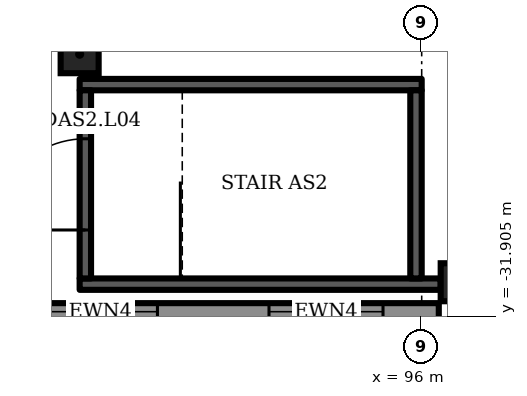
"""IFC4 building model, lengths in metres.
Left out: names, types, materials, properties, quantities, classifications, styles, units other than length and angle.
Written with IfcOpenShell. Run it as: python <this file> out.ifc"""

import sys

from ifc_helpers import new_model, si_unit, direction, frame, frame_2d, origin, origin_2d, place, context, subcontext, project, spatial, rectangle, extrude, element, fill, save


model = new_model("IFC4")
c1 = context("Model", 3, precision=1e-05, world=origin(), true_north=direction((0.0, 1.0)))
c2 = subcontext(c1, "Body", "Model", "MODEL_VIEW")
j1 = project(units=[si_unit("LENGTHUNIT", "METRE"), si_unit("PLANEANGLEUNIT", "RADIAN")], contexts=[c1])
p1 = place(None, origin())
s1 = spatial("IfcSite", under=j1, at=p1, CompositionType="ELEMENT")
p2 = place(p1, origin())
s2 = spatial("IfcBuilding", under=s1, at=p2, CompositionType="ELEMENT")
p3 = place(p2, frame((0.0, 0.0, 27.5)))
s3 = spatial("IfcBuildingStorey", under=s2, at=p3, CompositionType="ELEMENT", Elevation=27.5)
for number, where, z_axis, x_axis in (
    (1, (97.0, -31.0, 0.0), (0.0, 0.0, 1.0), (1.0, 0.0, 0.0)),
    (2, (87.0, -25.0, 0.0), (0.0, 0.0, 1.0), (1.0, 0.0, 0.0)),
):
    element("IfcColumn", number, at=place(p3, frame(where, z_axis=z_axis, x_axis=x_axis)), inside=s3, PredefinedType="COLUMN", context=c2, shape_type="SweptSolid", body=[
        extrude(rectangle(XDim=1.0, YDim=1.0, at=origin_2d()), origin(), (0.0, 0.0, 1.0), 5.5),
    ])
p4 = place(p3, frame((-4.45, -31.775, 0.0), z_axis=(0.0, 0.0, 1.0), x_axis=(1.0, 0.0, 0.0)))
e3 = element("IfcWall", 3, at=p4, inside=s3, PredefinedType="SOLIDWALL", context=c2, shape_type="SweptSolid", body=[
    extrude(rectangle(XDim=100.9, YDim=0.45, at=frame_2d((50.45, 0.0))), origin(), (0.0, 0.0, 1.0), 5.2),
])
p5 = place(p4, frame((1.468, 0.0, 1.0)))
e4 = element("IfcOpeningElement", 4, at=p5, cuts=e3, PredefinedType="OPENING", context=c2, shape_type="SweptSolid", body=[
    extrude(rectangle(XDim=3.0, YDim=3.2, at=frame_2d((1.5, 1.6))), frame((0.0, 0.235, 0.0), z_axis=(0.0, -1.0, 0.0), x_axis=(1.0, 0.0, 0.0)), (0.0, 0.0, 1.0), 0.47),
])
p6 = place(p4, frame((7.403, 0.0, 1.0)))
e5 = element("IfcOpeningElement", 5, at=p6, cuts=e3, PredefinedType="OPENING", context=c2, shape_type="SweptSolid", body=[
    extrude(rectangle(XDim=3.0, YDim=3.2, at=frame_2d((1.5, 1.6))), frame((0.0, 0.235, 0.0), z_axis=(0.0, -1.0, 0.0), x_axis=(1.0, 0.0, 0.0)), (0.0, 0.0, 1.0), 0.47),
])
p7 = place(p4, frame((13.338, 0.0, 1.0)))
e6 = element("IfcOpeningElement", 6, at=p7, cuts=e3, PredefinedType="OPENING", context=c2, shape_type="SweptSolid", body=[
    extrude(rectangle(XDim=3.0, YDim=3.2, at=frame_2d((1.5, 1.6))), frame((0.0, 0.235, 0.0), z_axis=(0.0, -1.0, 0.0), x_axis=(1.0, 0.0, 0.0)), (0.0, 0.0, 1.0), 0.47),
])
p8 = place(p4, frame((19.273, 0.0, 1.0)))
e7 = element("IfcOpeningElement", 7, at=p8, cuts=e3, PredefinedType="OPENING", context=c2, shape_type="SweptSolid", body=[
    extrude(rectangle(XDim=3.0, YDim=3.2, at=frame_2d((1.5, 1.6))), frame((0.0, 0.235, 0.0), z_axis=(0.0, -1.0, 0.0), x_axis=(1.0, 0.0, 0.0)), (0.0, 0.0, 1.0), 0.47),
])
p9 = place(p4, frame((25.209, 0.0, 1.0)))
e8 = element("IfcOpeningElement", 8, at=p9, cuts=e3, PredefinedType="OPENING", context=c2, shape_type="SweptSolid", body=[
    extrude(rectangle(XDim=3.0, YDim=3.2, at=frame_2d((1.5, 1.6))), frame((0.0, 0.235, 0.0), z_axis=(0.0, -1.0, 0.0), x_axis=(1.0, 0.0, 0.0)), (0.0, 0.0, 1.0), 0.47),
])
p10 = place(p4, frame((31.144, 0.0, 1.0)))
e9 = element("IfcOpeningElement", 9, at=p10, cuts=e3, PredefinedType="OPENING", context=c2, shape_type="SweptSolid", body=[
    extrude(rectangle(XDim=3.0, YDim=3.2, at=frame_2d((1.5, 1.6))), frame((0.0, 0.235, 0.0), z_axis=(0.0, -1.0, 0.0), x_axis=(1.0, 0.0, 0.0)), (0.0, 0.0, 1.0), 0.47),
])
p11 = place(p4, frame((37.079, 0.0, 1.0)))
e10 = element("IfcOpeningElement", 10, at=p11, cuts=e3, PredefinedType="OPENING", context=c2, shape_type="SweptSolid", body=[
    extrude(rectangle(XDim=3.0, YDim=3.2, at=frame_2d((1.5, 1.6))), frame((0.0, 0.235, 0.0), z_axis=(0.0, -1.0, 0.0), x_axis=(1.0, 0.0, 0.0)), (0.0, 0.0, 1.0), 0.47),
])
p12 = place(p4, frame((43.015, 0.0, 1.0)))
e11 = element("IfcOpeningElement", 11, at=p12, cuts=e3, PredefinedType="OPENING", context=c2, shape_type="SweptSolid", body=[
    extrude(rectangle(XDim=3.0, YDim=3.2, at=frame_2d((1.5, 1.6))), frame((0.0, 0.235, 0.0), z_axis=(0.0, -1.0, 0.0), x_axis=(1.0, 0.0, 0.0)), (0.0, 0.0, 1.0), 0.47),
])
p13 = place(p4, frame((48.95, 0.0, 1.0)))
e12 = element("IfcOpeningElement", 12, at=p13, cuts=e3, PredefinedType="OPENING", context=c2, shape_type="SweptSolid", body=[
    extrude(rectangle(XDim=3.0, YDim=3.2, at=frame_2d((1.5, 1.6))), frame((0.0, 0.235, 0.0), z_axis=(0.0, -1.0, 0.0), x_axis=(1.0, 0.0, 0.0)), (0.0, 0.0, 1.0), 0.47),
])
p14 = place(p4, frame((54.885, 0.0, 1.0)))
e13 = element("IfcOpeningElement", 13, at=p14, cuts=e3, PredefinedType="OPENING", context=c2, shape_type="SweptSolid", body=[
    extrude(rectangle(XDim=3.0, YDim=3.2, at=frame_2d((1.5, 1.6))), frame((0.0, 0.235, 0.0), z_axis=(0.0, -1.0, 0.0), x_axis=(1.0, 0.0, 0.0)), (0.0, 0.0, 1.0), 0.47),
])
p15 = place(p4, frame((60.821, 0.0, 1.0)))
e14 = element("IfcOpeningElement", 14, at=p15, cuts=e3, PredefinedType="OPENING", context=c2, shape_type="SweptSolid", body=[
    extrude(rectangle(XDim=3.0, YDim=3.2, at=frame_2d((1.5, 1.6))), frame((0.0, 0.235, 0.0), z_axis=(0.0, -1.0, 0.0), x_axis=(1.0, 0.0, 0.0)), (0.0, 0.0, 1.0), 0.47),
])
p16 = place(p4, frame((66.756, 0.0, 1.0)))
e15 = element("IfcOpeningElement", 15, at=p16, cuts=e3, PredefinedType="OPENING", context=c2, shape_type="SweptSolid", body=[
    extrude(rectangle(XDim=3.0, YDim=3.2, at=frame_2d((1.5, 1.6))), frame((0.0, 0.235, 0.0), z_axis=(0.0, -1.0, 0.0), x_axis=(1.0, 0.0, 0.0)), (0.0, 0.0, 1.0), 0.47),
])
p17 = place(p4, frame((72.691, 0.0, 1.0)))
e16 = element("IfcOpeningElement", 16, at=p17, cuts=e3, PredefinedType="OPENING", context=c2, shape_type="SweptSolid", body=[
    extrude(rectangle(XDim=3.0, YDim=3.2, at=frame_2d((1.5, 1.6))), frame((0.0, 0.235, 0.0), z_axis=(0.0, -1.0, 0.0), x_axis=(1.0, 0.0, 0.0)), (0.0, 0.0, 1.0), 0.47),
])
p18 = place(p4, frame((78.626, 0.0, 1.0)))
e17 = element("IfcOpeningElement", 17, at=p18, cuts=e3, PredefinedType="OPENING", context=c2, shape_type="SweptSolid", body=[
    extrude(rectangle(XDim=3.0, YDim=3.2, at=frame_2d((1.5, 1.6))), frame((0.0, 0.235, 0.0), z_axis=(0.0, -1.0, 0.0), x_axis=(1.0, 0.0, 0.0)), (0.0, 0.0, 1.0), 0.47),
])
p19 = place(p4, frame((84.562, 0.0, 1.0)))
e18 = element("IfcOpeningElement", 18, at=p19, cuts=e3, PredefinedType="OPENING", context=c2, shape_type="SweptSolid", body=[
    extrude(rectangle(XDim=3.0, YDim=3.2, at=frame_2d((1.5, 1.6))), frame((0.0, 0.235, 0.0), z_axis=(0.0, -1.0, 0.0), x_axis=(1.0, 0.0, 0.0)), (0.0, 0.0, 1.0), 0.47),
])
p20 = place(p4, frame((90.497, 0.0, 1.0)))
e19 = element("IfcOpeningElement", 19, at=p20, cuts=e3, PredefinedType="OPENING", context=c2, shape_type="SweptSolid", body=[
    extrude(rectangle(XDim=3.0, YDim=3.2, at=frame_2d((1.5, 1.6))), frame((0.0, 0.235, 0.0), z_axis=(0.0, -1.0, 0.0), x_axis=(1.0, 0.0, 0.0)), (0.0, 0.0, 1.0), 0.47),
])
p21 = place(p4, frame((96.432, 0.0, 1.0)))
e20 = element("IfcOpeningElement", 20, at=p21, cuts=e3, PredefinedType="OPENING", context=c2, shape_type="SweptSolid", body=[
    extrude(rectangle(XDim=3.0, YDim=3.2, at=frame_2d((1.5, 1.6))), frame((0.0, 0.235, 0.0), z_axis=(0.0, -1.0, 0.0), x_axis=(1.0, 0.0, 0.0)), (0.0, 0.0, 1.0), 0.47),
])
p22 = place(p3, frame((87.0, -31.05, 0.0), z_axis=(0.0, 0.0, 1.0), x_axis=(1.0, 0.0, 0.0)))
e21 = element("IfcWall", 21, at=p22, inside=s3, PredefinedType="SHEAR", context=c2, shape_type="SweptSolid", body=[
    extrude(rectangle(XDim=9.5, YDim=0.3, at=frame_2d((4.75, 0.0))), origin(), (0.0, 0.0, 1.0), 5.2),
])
p23 = place(p3, frame((87.0, -25.8, 0.0), z_axis=(0.0, 0.0, 1.0), x_axis=(1.0, 0.0, 0.0)))
e22 = element("IfcWall", 22, at=p23, inside=s3, PredefinedType="SHEAR", context=c2, shape_type="SweptSolid", body=[
    extrude(rectangle(XDim=9.0, YDim=0.3, at=frame_2d((4.5, 0.0))), origin(), (0.0, 0.0, 1.0), 5.2),
])
p24 = place(p3, frame((87.15, -30.9, 0.0), z_axis=(0.0, 0.0, 1.0), x_axis=(0.0, 1.0, 0.0)))
e23 = element("IfcWall", 23, at=p24, inside=s3, PredefinedType="SHEAR", context=c2, shape_type="SweptSolid", body=[
    extrude(rectangle(XDim=4.95, YDim=0.3, at=frame_2d((2.475, 0.0))), origin(), (0.0, 0.0, 1.0), 5.2),
])
p25 = place(p24, frame((1.275, 0.0, 0.0)))
e24 = element("IfcOpeningElement", 24, at=p25, cuts=e23, PredefinedType="OPENING", context=c2, shape_type="SweptSolid", body=[
    extrude(rectangle(XDim=2.4, YDim=2.1, at=frame_2d((1.2, 1.05))), frame((0.0, 0.16, 0.0), z_axis=(0.0, -1.0, 0.0), x_axis=(1.0, 0.0, 0.0)), (0.0, 0.0, 1.0), 0.32),
])
p26 = place(p3, frame((95.85, -30.9, 0.0), z_axis=(0.0, 0.0, 1.0), x_axis=(0.0, 1.0, 0.0)))
e25 = element("IfcWall", 25, at=p26, inside=s3, PredefinedType="SHEAR", context=c2, shape_type="SweptSolid", body=[
    extrude(rectangle(XDim=4.95, YDim=0.3, at=frame_2d((2.475, 0.0))), origin(), (0.0, 0.0, 1.0), 5.2),
])
p27 = place(p20, origin())
e26 = element("IfcWindow", 26, at=p27, inside=s3, PartitioningType="SINGLE_PANEL", PredefinedType="WINDOW", context=c2, shape_type="SweptSolid", body=[
    extrude(rectangle(XDim=3.0, YDim=3.2, at=frame_2d((1.5, 1.6))), frame((0.0, 0.105, 0.0), z_axis=(0.0, -1.0, 0.0), x_axis=(1.0, 0.0, 0.0)), (0.0, 0.0, 1.0), 0.06),
])
fill(e19, e26)
p28 = place(p21, origin())
e27 = element("IfcWindow", 27, at=p28, inside=s3, PartitioningType="SINGLE_PANEL", PredefinedType="WINDOW", context=c2, shape_type="SweptSolid", body=[
    extrude(rectangle(XDim=3.0, YDim=3.2, at=frame_2d((1.5, 1.6))), frame((0.0, 0.105, 0.0), z_axis=(0.0, -1.0, 0.0), x_axis=(1.0, 0.0, 0.0)), (0.0, 0.0, 1.0), 0.06),
])
fill(e20, e27)
p29 = place(p25, origin())
e28 = element("IfcDoor", 28, at=p29, inside=s3, OperationType="DOUBLE_DOOR_SINGLE_SWING", PredefinedType="DOOR", context=c2, shape_type="SweptSolid", body=[
    extrude(rectangle(XDim=2.4, YDim=2.1, at=frame_2d((1.2, 1.05))), frame((0.0, 0.025, 0.0), z_axis=(0.0, -1.0, 0.0), x_axis=(1.0, 0.0, 0.0)), (0.0, 0.0, 1.0), 0.05),
])
fill(e24, e28)
save(model, sys.argv[1])
